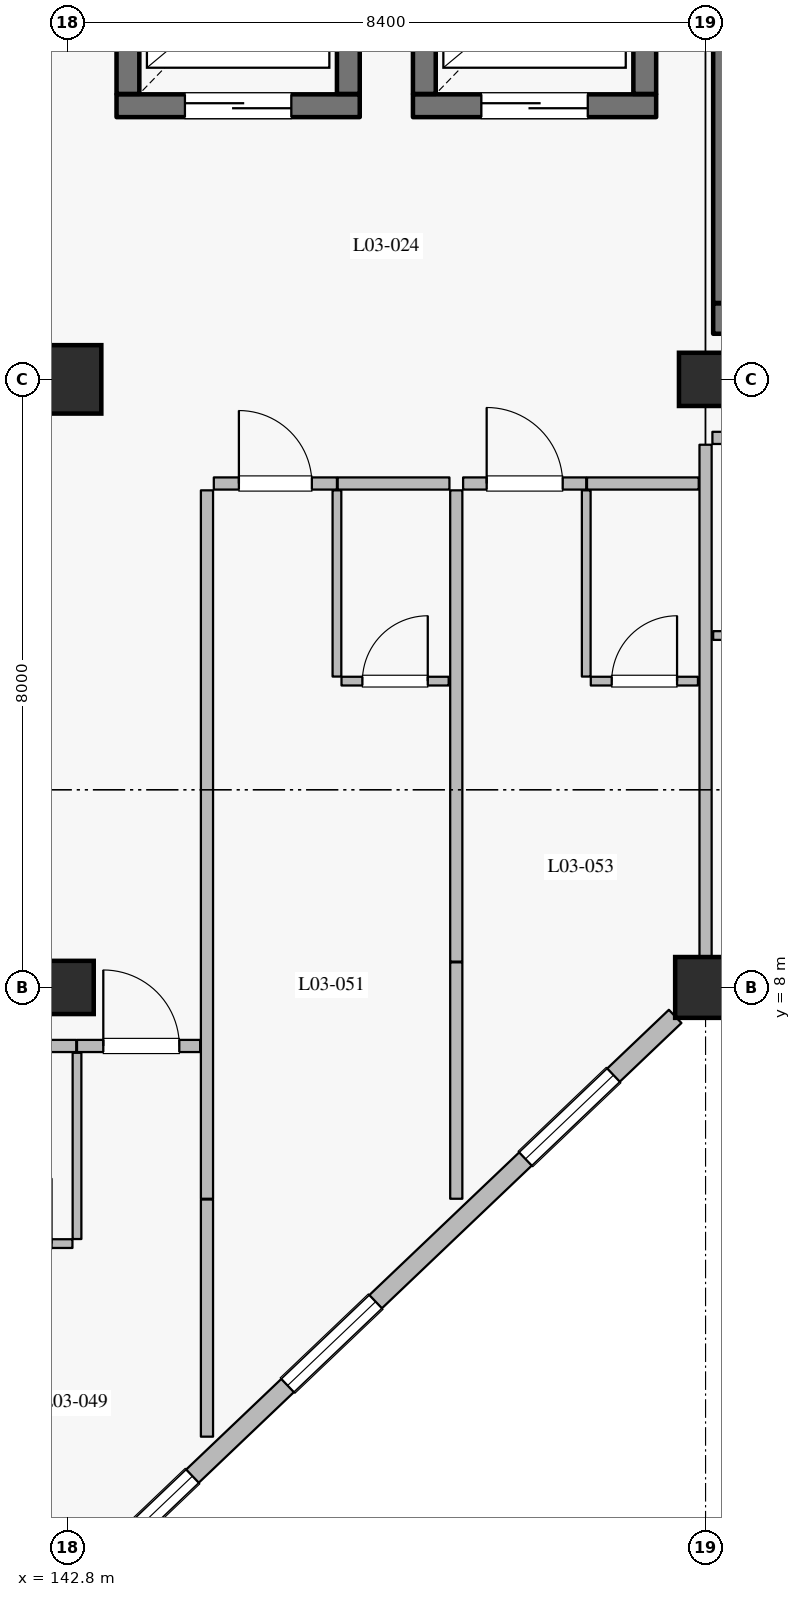
"""IFC4 building model, lengths in metres.
Left out: names, types, materials, properties, quantities, classifications, styles, units other than length and angle.
Written with IfcOpenShell. Run it as: python <this file> out.ifc"""

import sys

from ifc_helpers import new_model, si_unit, direction, frame, frame_2d, origin, origin_2d, place, context, subcontext, project, spatial, rectangle, extrude, element, fill, save


model = new_model("IFC4")
c1 = context("Model", 3, precision=1e-05, world=origin(), true_north=direction((0.0, 1.0)))
c2 = subcontext(c1, "Body", "Model", "MODEL_VIEW")
j1 = project(units=[si_unit("LENGTHUNIT", "METRE"), si_unit("PLANEANGLEUNIT", "RADIAN")], contexts=[c1])
p1 = place(None, origin())
s1 = spatial("IfcSite", under=j1, at=p1, CompositionType="ELEMENT")
p2 = place(p1, origin())
s2 = spatial("IfcBuilding", under=s1, at=p2, CompositionType="ELEMENT")
p3 = place(p2, frame((0.0, 0.0, 16.2)))
s3 = spatial("IfcBuildingStorey", under=s2, at=p3, CompositionType="ELEMENT", Elevation=16.2)
p4 = place(p3, frame((142.8, 16.0, 0.0), z_axis=(0.0, 0.0, 1.0), x_axis=(1.0, 0.0, 0.0)))
e1 = element("IfcColumn", 1, at=p4, inside=s3, PredefinedType="COLUMN", context=c2, shape_type="SweptSolid", body=[
    extrude(rectangle(XDim=0.9, YDim=0.9, at=origin_2d()), origin(), (0.0, 0.0, 1.0), 4.8),
])
p5 = place(p3, frame((151.2, 8.0, 0.0), z_axis=(0.0, 0.0, 1.0), x_axis=(1.0, 0.0, 0.0)))
e2 = element("IfcColumn", 2, at=p5, inside=s3, PredefinedType="COLUMN", context=c2, shape_type="SweptSolid", body=[
    extrude(rectangle(XDim=0.8, YDim=0.8, at=origin_2d()), origin(), (0.0, 0.0, 1.0), 4.8),
])
for number, where, z_axis, x_axis in (
    (3, (142.8, 8.0, 0.0), (0.0, 0.0, 1.0), (1.0, 0.0, 0.0)),
    (4, (151.2, 16.0, 0.0), (0.0, 0.0, 1.0), (1.0, 0.0, 0.0)),
):
    element("IfcColumn", number, at=place(p3, frame(where, z_axis=z_axis, x_axis=x_axis)), inside=s3, PredefinedType="COLUMN", context=c2, shape_type="SweptSolid", body=[
        extrude(rectangle(XDim=0.7, YDim=0.7, at=origin_2d()), origin(), (0.0, 0.0, 1.0), 4.8),
    ])
p6 = place(p3, frame((150.8, 7.619, 0.0), z_axis=(0.0, 0.0, 1.0), x_axis=(-0.724156739794, -0.689635422677, 0.0)))
e5 = element("IfcWall", 5, at=p6, inside=s3, PredefinedType="SOLIDWALL", context=c2, shape_type="SweptSolid", body=[
    extrude(rectangle(XDim=10.495, YDim=0.24, at=frame_2d((5.248, 0.0))), origin(), (0.0, 0.0, 1.0), 4.13),
])
p7 = place(p6, frame((1.12, 0.0, 0.8)))
e6 = element("IfcOpeningElement", 6, at=p7, cuts=e5, PredefinedType="OPENING", context=c2, shape_type="SweptSolid", body=[
    extrude(rectangle(XDim=1.6, YDim=1.6, at=frame_2d((0.8, 0.8))), frame((0.0, 0.13, 0.0), z_axis=(0.0, -1.0, 0.0), x_axis=(1.0, 0.0, 0.0)), (0.0, 0.0, 1.0), 0.26),
])
p8 = place(p6, frame((5.442, 0.0, 0.8)))
e7 = element("IfcOpeningElement", 7, at=p8, cuts=e5, PredefinedType="OPENING", context=c2, shape_type="SweptSolid", body=[
    extrude(rectangle(XDim=1.6, YDim=1.6, at=frame_2d((0.8, 0.8))), frame((0.0, 0.13, 0.0), z_axis=(0.0, -1.0, 0.0), x_axis=(1.0, 0.0, 0.0)), (0.0, 0.0, 1.0), 0.26),
])
p9 = place(p6, frame((8.77, 0.0, 0.8)))
e8 = element("IfcOpeningElement", 8, at=p9, cuts=e5, PredefinedType="OPENING", context=c2, shape_type="SweptSolid", body=[
    extrude(rectangle(XDim=1.6, YDim=1.6, at=frame_2d((0.8, 0.8))), frame((0.0, 0.13, 0.0), z_axis=(0.0, -1.0, 0.0), x_axis=(1.0, 0.0, 0.0)), (0.0, 0.0, 1.0), 0.26),
])
p10 = place(p3, frame((143.45, 19.6, 0.0), z_axis=(0.0, 0.0, 1.0), x_axis=(1.0, 0.0, 0.0)))
e9 = element("IfcWall", 9, at=p10, inside=s3, PredefinedType="SHEAR", context=c2, shape_type="SweptSolid", body=[
    extrude(rectangle(XDim=3.2, YDim=0.3, at=frame_2d((1.6, 0.0))), origin(), (0.0, 0.0, 1.0), 4.535),
])
p11 = place(p10, frame((0.9, 0.0, 0.0)))
e10 = element("IfcOpeningElement", 10, at=p11, cuts=e9, PredefinedType="OPENING", context=c2, shape_type="SweptSolid", body=[
    extrude(rectangle(XDim=1.4, YDim=2.35, at=frame_2d((0.7, 1.175))), frame((0.0, 0.16, 0.0), z_axis=(0.0, -1.0, 0.0), x_axis=(1.0, 0.0, 0.0)), (0.0, 0.0, 1.0), 0.32),
])
for number, where, z_axis, x_axis in (
    (11, (146.5, 19.755, 0.0), (0.0, 0.0, 1.0), (0.0, 1.0, 0.0)),
    (12, (143.6, 22.445, 0.0), (0.0, 0.0, 1.0), (0.0, -1.0, 0.0)),
):
    element("IfcWall", number, at=place(p3, frame(where, z_axis=z_axis, x_axis=x_axis)), inside=s3, PredefinedType="SHEAR", context=c2, shape_type="SweptSolid", body=[
        extrude(rectangle(XDim=2.69, YDim=0.3, at=frame_2d((1.345, 0.0))), origin(), (0.0, 0.0, 1.0), 4.535),
    ])
p12 = place(p3, frame((147.35, 19.6, 0.0), z_axis=(0.0, 0.0, 1.0), x_axis=(1.0, 0.0, 0.0)))
e13 = element("IfcWall", 13, at=p12, inside=s3, PredefinedType="SHEAR", context=c2, shape_type="SweptSolid", body=[
    extrude(rectangle(XDim=3.2, YDim=0.3, at=frame_2d((1.6, 0.0))), origin(), (0.0, 0.0, 1.0), 4.535),
])
p13 = place(p12, frame((0.9, 0.0, 0.0)))
e14 = element("IfcOpeningElement", 14, at=p13, cuts=e13, PredefinedType="OPENING", context=c2, shape_type="SweptSolid", body=[
    extrude(rectangle(XDim=1.4, YDim=2.35, at=frame_2d((0.7, 1.175))), frame((0.0, 0.16, 0.0), z_axis=(0.0, -1.0, 0.0), x_axis=(1.0, 0.0, 0.0)), (0.0, 0.0, 1.0), 0.32),
])
for number, where, z_axis, x_axis in (
    (15, (150.4, 19.755, 0.0), (0.0, 0.0, 1.0), (0.0, 1.0, 0.0)),
    (16, (147.5, 22.445, 0.0), (0.0, 0.0, 1.0), (0.0, -1.0, 0.0)),
):
    element("IfcWall", number, at=place(p3, frame(where, z_axis=z_axis, x_axis=x_axis)), inside=s3, PredefinedType="SHEAR", context=c2, shape_type="SweptSolid", body=[
        extrude(rectangle(XDim=2.69, YDim=0.3, at=frame_2d((1.345, 0.0))), origin(), (0.0, 0.0, 1.0), 4.535),
    ])
p14 = place(p3, frame((151.3, 16.8, 0.0), z_axis=(0.0, 0.0, 1.0), x_axis=(1.0, 0.0, 0.0)))
e17 = element("IfcWall", 17, at=p14, inside=s3, PredefinedType="SHEAR", context=c2, shape_type="SweptSolid", body=[
    extrude(rectangle(XDim=8.2, YDim=0.4, at=frame_2d((4.1, 0.0))), origin(), (0.0, 0.0, 1.0), 4.535),
])
p15 = place(p3, frame((151.5, 17.005, 0.0), z_axis=(0.0, 0.0, 1.0), x_axis=(0.0, 1.0, 0.0)))
e18 = element("IfcWall", 18, at=p15, inside=s3, PredefinedType="SHEAR", context=c2, shape_type="SweptSolid", body=[
    extrude(rectangle(XDim=3.95, YDim=0.4, at=frame_2d((1.975, 0.0))), origin(), (0.0, 0.0, 1.0), 4.535),
])
p16 = place(p3, frame((141.45, 7.23, 0.0), z_axis=(0.0, 0.0, 1.0), x_axis=(1.0, 0.0, 0.0)))
e19 = element("IfcWall", 19, at=p16, inside=s3, PredefinedType="PARTITIONING", context=c2, shape_type="SweptSolid", body=[
    extrude(rectangle(XDim=1.47, YDim=0.16, at=frame_2d((0.735, 0.0))), origin(), (0.0, 0.0, 1.0), 4.535),
])
p17 = place(p3, frame((142.93, 7.23, 0.0), z_axis=(0.0, 0.0, 1.0), x_axis=(1.0, 0.0, 0.0)))
e20 = element("IfcWall", 20, at=p17, inside=s3, PredefinedType="PARTITIONING", context=c2, shape_type="SweptSolid", body=[
    extrude(rectangle(XDim=1.62, YDim=0.16, at=frame_2d((0.81, 0.0))), origin(), (0.0, 0.0, 1.0), 4.535),
])
p18 = place(p17, frame((0.346, 0.0, 0.0)))
e21 = element("IfcOpeningElement", 21, at=p18, cuts=e20, PredefinedType="OPENING", context=c2, shape_type="SweptSolid", body=[
    extrude(rectangle(XDim=1.0, YDim=2.25, at=frame_2d((0.5, 1.125))), frame((0.0, 0.09, 0.0), z_axis=(0.0, -1.0, 0.0), x_axis=(1.0, 0.0, 0.0)), (0.0, 0.0, 1.0), 0.18),
])
p19 = place(p3, frame((142.93, 4.69, 0.0), z_axis=(0.0, 0.0, 1.0), x_axis=(0.0, 1.0, 0.0)))
e22 = element("IfcWall", 22, at=p19, inside=s3, PredefinedType="PARTITIONING", context=c2, shape_type="SweptSolid", body=[
    extrude(rectangle(XDim=2.45, YDim=0.115, at=frame_2d((1.225, 0.0))), origin(), (0.0, 0.0, 1.0), 4.535),
])
p20 = place(p3, frame((141.46, 4.63, 0.0), z_axis=(0.0, 0.0, 1.0), x_axis=(1.0, 0.0, 0.0)))
e23 = element("IfcWall", 23, at=p20, inside=s3, PredefinedType="PARTITIONING", context=c2, shape_type="SweptSolid", body=[
    extrude(rectangle(XDim=1.41, YDim=0.115, at=frame_2d((0.705, 0.0))), origin(), (0.0, 0.0, 1.0), 4.535),
])
p21 = place(p20, frame((0.275, 0.0, 0.0)))
e24 = element("IfcOpeningElement", 24, at=p21, cuts=e23, PredefinedType="OPENING", context=c2, shape_type="SweptSolid", body=[
    extrude(rectangle(XDim=0.86, YDim=2.12, at=frame_2d((0.43, 1.06))), frame((0.0, 0.067, 0.0), z_axis=(0.0, -1.0, 0.0), x_axis=(1.0, 0.0, 0.0)), (0.0, 0.0, 1.0), 0.135),
])
p22 = place(p3, frame((144.64, 2.09, 0.0), z_axis=(0.0, 0.0, 1.0), x_axis=(0.0, 1.0, 0.0)))
e25 = element("IfcWall", 25, at=p22, inside=s3, PredefinedType="PARTITIONING", context=c2, shape_type="SweptSolid", body=[
    extrude(rectangle(XDim=3.12, YDim=0.16, at=frame_2d((1.56, 0.0))), origin(), (0.0, 0.0, 1.0), 4.535),
])
p23 = place(p3, frame((144.73, 14.63, 0.0), z_axis=(0.0, 0.0, 1.0), x_axis=(1.0, 0.0, 0.0)))
e26 = element("IfcWall", 26, at=p23, inside=s3, PredefinedType="PARTITIONING", context=c2, shape_type="SweptSolid", body=[
    extrude(rectangle(XDim=1.62, YDim=0.16, at=frame_2d((0.81, 0.0))), origin(), (0.0, 0.0, 1.0), 4.535),
])
p24 = place(p23, frame((0.33, 0.0, 0.0)))
e27 = element("IfcOpeningElement", 27, at=p24, cuts=e26, PredefinedType="OPENING", context=c2, shape_type="SweptSolid", body=[
    extrude(rectangle(XDim=0.96, YDim=2.2, at=frame_2d((0.48, 1.1))), frame((0.0, 0.09, 0.0), z_axis=(0.0, -1.0, 0.0), x_axis=(1.0, 0.0, 0.0)), (0.0, 0.0, 1.0), 0.18),
])
p25 = place(p3, frame((146.36, 14.63, 0.0), z_axis=(0.0, 0.0, 1.0), x_axis=(1.0, 0.0, 0.0)))
e28 = element("IfcWall", 28, at=p25, inside=s3, PredefinedType="PARTITIONING", context=c2, shape_type="SweptSolid", body=[
    extrude(rectangle(XDim=1.47, YDim=0.16, at=frame_2d((0.735, 0.0))), origin(), (0.0, 0.0, 1.0), 4.535),
])
p26 = place(p3, frame((146.35, 12.09, 0.0), z_axis=(0.0, 0.0, 1.0), x_axis=(0.0, 1.0, 0.0)))
e29 = element("IfcWall", 29, at=p26, inside=s3, PredefinedType="PARTITIONING", context=c2, shape_type="SweptSolid", body=[
    extrude(rectangle(XDim=2.45, YDim=0.115, at=frame_2d((1.225, 0.0))), origin(), (0.0, 0.0, 1.0), 4.535),
])
p27 = place(p3, frame((146.41, 12.03, 0.0), z_axis=(0.0, 0.0, 1.0), x_axis=(1.0, 0.0, 0.0)))
e30 = element("IfcWall", 30, at=p27, inside=s3, PredefinedType="PARTITIONING", context=c2, shape_type="SweptSolid", body=[
    extrude(rectangle(XDim=1.41, YDim=0.115, at=frame_2d((0.705, 0.0))), origin(), (0.0, 0.0, 1.0), 4.535),
])
p28 = place(p27, frame((0.275, 0.0, 0.0)))
e31 = element("IfcOpeningElement", 31, at=p28, cuts=e30, PredefinedType="OPENING", context=c2, shape_type="SweptSolid", body=[
    extrude(rectangle(XDim=0.86, YDim=2.12, at=frame_2d((0.43, 1.06))), frame((0.0, 0.067, 0.0), z_axis=(0.0, -1.0, 0.0), x_axis=(1.0, 0.0, 0.0)), (0.0, 0.0, 1.0), 0.135),
])
p29 = place(p3, frame((144.64, 5.22, 0.0), z_axis=(0.0, 0.0, 1.0), x_axis=(0.0, 1.0, 0.0)))
e32 = element("IfcWall", 32, at=p29, inside=s3, PredefinedType="PARTITIONING", context=c2, shape_type="SweptSolid", body=[
    extrude(rectangle(XDim=9.32, YDim=0.16, at=frame_2d((4.66, 0.0))), origin(), (0.0, 0.0, 1.0), 4.535),
])
p30 = place(p3, frame((147.92, 5.22, 0.0), z_axis=(0.0, 0.0, 1.0), x_axis=(0.0, 1.0, 0.0)))
e33 = element("IfcWall", 33, at=p30, inside=s3, PredefinedType="PARTITIONING", context=c2, shape_type="SweptSolid", body=[
    extrude(rectangle(XDim=3.11, YDim=0.16, at=frame_2d((1.555, 0.0))), origin(), (0.0, 0.0, 1.0), 4.535),
])
p31 = place(p3, frame((148.01, 14.63, 0.0), z_axis=(0.0, 0.0, 1.0), x_axis=(1.0, 0.0, 0.0)))
e34 = element("IfcWall", 34, at=p31, inside=s3, PredefinedType="PARTITIONING", context=c2, shape_type="SweptSolid", body=[
    extrude(rectangle(XDim=1.62, YDim=0.16, at=frame_2d((0.81, 0.0))), origin(), (0.0, 0.0, 1.0), 4.535),
])
p32 = place(p31, frame((0.31, 0.0, 0.0)))
e35 = element("IfcOpeningElement", 35, at=p32, cuts=e34, PredefinedType="OPENING", context=c2, shape_type="SweptSolid", body=[
    extrude(rectangle(XDim=1.0, YDim=2.25, at=frame_2d((0.5, 1.125))), frame((0.0, 0.09, 0.0), z_axis=(0.0, -1.0, 0.0), x_axis=(1.0, 0.0, 0.0)), (0.0, 0.0, 1.0), 0.18),
])
p33 = place(p3, frame((149.64, 14.63, 0.0), z_axis=(0.0, 0.0, 1.0), x_axis=(1.0, 0.0, 0.0)))
e36 = element("IfcWall", 36, at=p33, inside=s3, PredefinedType="PARTITIONING", context=c2, shape_type="SweptSolid", body=[
    extrude(rectangle(XDim=1.47, YDim=0.16, at=frame_2d((0.735, 0.0))), origin(), (0.0, 0.0, 1.0), 4.535),
])
p34 = place(p3, frame((149.63, 12.09, 0.0), z_axis=(0.0, 0.0, 1.0), x_axis=(0.0, 1.0, 0.0)))
e37 = element("IfcWall", 37, at=p34, inside=s3, PredefinedType="PARTITIONING", context=c2, shape_type="SweptSolid", body=[
    extrude(rectangle(XDim=2.45, YDim=0.115, at=frame_2d((1.225, 0.0))), origin(), (0.0, 0.0, 1.0), 4.535),
])
p35 = place(p3, frame((149.69, 12.03, 0.0), z_axis=(0.0, 0.0, 1.0), x_axis=(1.0, 0.0, 0.0)))
e38 = element("IfcWall", 38, at=p35, inside=s3, PredefinedType="PARTITIONING", context=c2, shape_type="SweptSolid", body=[
    extrude(rectangle(XDim=1.41, YDim=0.115, at=frame_2d((0.705, 0.0))), origin(), (0.0, 0.0, 1.0), 4.535),
])
p36 = place(p35, frame((0.275, 0.0, 0.0)))
e39 = element("IfcOpeningElement", 39, at=p36, cuts=e38, PredefinedType="OPENING", context=c2, shape_type="SweptSolid", body=[
    extrude(rectangle(XDim=0.86, YDim=2.12, at=frame_2d((0.43, 1.06))), frame((0.0, 0.067, 0.0), z_axis=(0.0, -1.0, 0.0), x_axis=(1.0, 0.0, 0.0)), (0.0, 0.0, 1.0), 0.135),
])
p37 = place(p3, frame((147.92, 8.34, 0.0), z_axis=(0.0, 0.0, 1.0), x_axis=(0.0, 1.0, 0.0)))
e40 = element("IfcWall", 40, at=p37, inside=s3, PredefinedType="PARTITIONING", context=c2, shape_type="SweptSolid", body=[
    extrude(rectangle(XDim=6.2, YDim=0.16, at=frame_2d((3.1, 0.0))), origin(), (0.0, 0.0, 1.0), 4.535),
])
p38 = place(p3, frame((151.29, 15.23, 0.0), z_axis=(0.0, 0.0, 1.0), x_axis=(1.0, 0.0, 0.0)))
e41 = element("IfcWall", 41, at=p38, inside=s3, PredefinedType="PARTITIONING", context=c2, shape_type="SweptSolid", body=[
    extrude(rectangle(XDim=1.47, YDim=0.16, at=frame_2d((0.735, 0.0))), origin(), (0.0, 0.0, 1.0), 4.535),
])
p39 = place(p3, frame((151.3, 12.63, 0.0), z_axis=(0.0, 0.0, 1.0), x_axis=(1.0, 0.0, 0.0)))
e42 = element("IfcWall", 42, at=p39, inside=s3, PredefinedType="PARTITIONING", context=c2, shape_type="SweptSolid", body=[
    extrude(rectangle(XDim=1.41, YDim=0.115, at=frame_2d((0.705, 0.0))), origin(), (0.0, 0.0, 1.0), 4.535),
])
p40 = place(p39, frame((0.275, 0.0, 0.0)))
e43 = element("IfcOpeningElement", 43, at=p40, cuts=e42, PredefinedType="OPENING", context=c2, shape_type="SweptSolid", body=[
    extrude(rectangle(XDim=0.86, YDim=2.12, at=frame_2d((0.43, 1.06))), frame((0.0, 0.067, 0.0), z_axis=(0.0, -1.0, 0.0), x_axis=(1.0, 0.0, 0.0)), (0.0, 0.0, 1.0), 0.135),
])
p41 = place(p3, frame((151.2, 8.34, 0.0), z_axis=(0.0, 0.0, 1.0), x_axis=(0.0, 1.0, 0.0)))
e44 = element("IfcWall", 44, at=p41, inside=s3, PredefinedType="PARTITIONING", context=c2, shape_type="SweptSolid", body=[
    extrude(rectangle(XDim=6.8, YDim=0.16, at=frame_2d((3.4, 0.0))), origin(), (0.0, 0.0, 1.0), 3.98),
])
p42 = place(p7, origin())
e45 = element("IfcWindow", 45, at=p42, inside=s3, PartitioningType="SINGLE_PANEL", PredefinedType="WINDOW", context=c2, shape_type="SweptSolid", body=[
    extrude(rectangle(XDim=1.6, YDim=1.6, at=frame_2d((0.8, 0.8))), frame((0.0, 0.03, 0.0), z_axis=(0.0, -1.0, 0.0), x_axis=(1.0, 0.0, 0.0)), (0.0, 0.0, 1.0), 0.06),
])
fill(e6, e45)
p43 = place(p8, origin())
e46 = element("IfcWindow", 46, at=p43, inside=s3, PartitioningType="SINGLE_PANEL", PredefinedType="WINDOW", context=c2, shape_type="SweptSolid", body=[
    extrude(rectangle(XDim=1.6, YDim=1.6, at=frame_2d((0.8, 0.8))), frame((0.0, 0.03, 0.0), z_axis=(0.0, -1.0, 0.0), x_axis=(1.0, 0.0, 0.0)), (0.0, 0.0, 1.0), 0.06),
])
fill(e7, e46)
p44 = place(p9, origin())
e47 = element("IfcWindow", 47, at=p44, inside=s3, PartitioningType="SINGLE_PANEL", PredefinedType="WINDOW", context=c2, shape_type="SweptSolid", body=[
    extrude(rectangle(XDim=1.6, YDim=1.6, at=frame_2d((0.8, 0.8))), frame((0.0, 0.03, 0.0), z_axis=(0.0, -1.0, 0.0), x_axis=(1.0, 0.0, 0.0)), (0.0, 0.0, 1.0), 0.06),
])
fill(e8, e47)
p45 = place(p11, origin())
e48 = element("IfcDoor", 48, at=p45, inside=s3, OperationType="DOUBLE_DOOR_SLIDING", PredefinedType="DOOR", context=c2, shape_type="SweptSolid", body=[
    extrude(rectangle(XDim=1.4, YDim=2.35, at=frame_2d((0.7, 1.175))), frame((0.0, 0.025, 0.0), z_axis=(0.0, -1.0, 0.0), x_axis=(1.0, 0.0, 0.0)), (0.0, 0.0, 1.0), 0.05),
])
fill(e10, e48)
p46 = place(p13, origin())
e49 = element("IfcDoor", 49, at=p46, inside=s3, OperationType="DOUBLE_DOOR_SLIDING", PredefinedType="DOOR", context=c2, shape_type="SweptSolid", body=[
    extrude(rectangle(XDim=1.4, YDim=2.35, at=frame_2d((0.7, 1.175))), frame((0.0, 0.025, 0.0), z_axis=(0.0, -1.0, 0.0), x_axis=(1.0, 0.0, 0.0)), (0.0, 0.0, 1.0), 0.05),
])
fill(e14, e49)
p47 = place(p18, origin())
e50 = element("IfcDoor", 50, at=p47, inside=s3, OperationType="SINGLE_SWING_LEFT", PredefinedType="DOOR", context=c2, shape_type="SweptSolid", body=[
    extrude(rectangle(XDim=1.0, YDim=2.25, at=frame_2d((0.5, 1.125))), frame((0.0, 0.025, 0.0), z_axis=(0.0, -1.0, 0.0), x_axis=(1.0, 0.0, 0.0)), (0.0, 0.0, 1.0), 0.05),
])
fill(e21, e50)
p48 = place(p24, origin())
e51 = element("IfcDoor", 51, at=p48, inside=s3, OperationType="SINGLE_SWING_LEFT", PredefinedType="DOOR", context=c2, shape_type="SweptSolid", body=[
    extrude(rectangle(XDim=0.96, YDim=2.2, at=frame_2d((0.48, 1.1))), frame((0.0, 0.025, 0.0), z_axis=(0.0, -1.0, 0.0), x_axis=(1.0, 0.0, 0.0)), (0.0, 0.0, 1.0), 0.05),
])
fill(e27, e51)
p49 = place(p28, origin())
e52 = element("IfcDoor", 52, at=p49, inside=s3, OperationType="SINGLE_SWING_RIGHT", PredefinedType="DOOR", context=c2, shape_type="SweptSolid", body=[
    extrude(rectangle(XDim=0.86, YDim=2.12, at=frame_2d((0.43, 1.06))), frame((0.0, 0.025, 0.0), z_axis=(0.0, -1.0, 0.0), x_axis=(1.0, 0.0, 0.0)), (0.0, 0.0, 1.0), 0.05),
])
fill(e31, e52)
p50 = place(p32, origin())
e53 = element("IfcDoor", 53, at=p50, inside=s3, OperationType="SINGLE_SWING_LEFT", PredefinedType="DOOR", context=c2, shape_type="SweptSolid", body=[
    extrude(rectangle(XDim=1.0, YDim=2.25, at=frame_2d((0.5, 1.125))), frame((0.0, 0.025, 0.0), z_axis=(0.0, -1.0, 0.0), x_axis=(1.0, 0.0, 0.0)), (0.0, 0.0, 1.0), 0.05),
])
fill(e35, e53)
p51 = place(p36, origin())
e54 = element("IfcDoor", 54, at=p51, inside=s3, OperationType="SINGLE_SWING_RIGHT", PredefinedType="DOOR", context=c2, shape_type="SweptSolid", body=[
    extrude(rectangle(XDim=0.86, YDim=2.12, at=frame_2d((0.43, 1.06))), frame((0.0, 0.025, 0.0), z_axis=(0.0, -1.0, 0.0), x_axis=(1.0, 0.0, 0.0)), (0.0, 0.0, 1.0), 0.05),
])
fill(e39, e54)
save(model, sys.argv[1])
